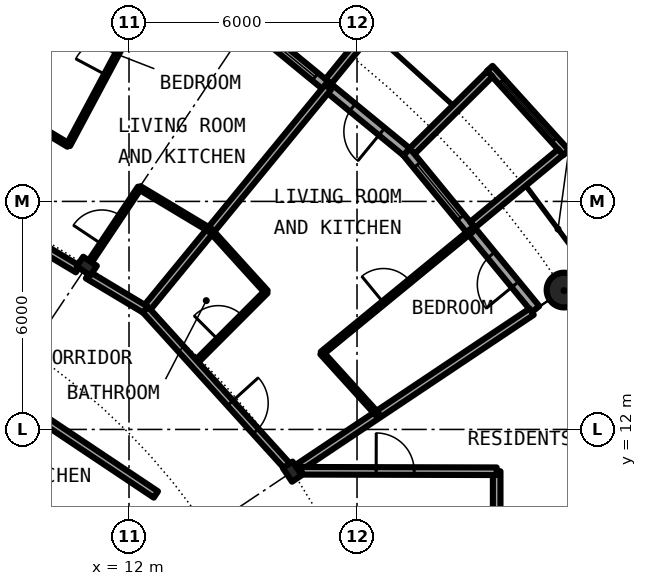
"""IFC4 building model, lengths in metres.
Left out: names, types, materials, properties, quantities, classifications, styles, units other than length and angle.
Written with IfcOpenShell. Run it as: python <this file> out.ifc"""

import sys

from ifc_helpers import new_model, si_unit, direction, frame, frame_2d, origin, origin_2d, place, context, subcontext, project, spatial, rectangle, circle, hollow_circle, i_section, extrude, element, fill, save


model = new_model("IFC4")
c1 = context("Model", 3, precision=1e-05, world=origin(), true_north=direction((0.0, 1.0)))
c2 = subcontext(c1, "Body", "Model", "MODEL_VIEW")
j1 = project(units=[si_unit("LENGTHUNIT", "METRE"), si_unit("PLANEANGLEUNIT", "RADIAN")], contexts=[c1])
p1 = place(None, origin())
s1 = spatial("IfcSite", under=j1, at=p1, CompositionType="ELEMENT")
p2 = place(p1, origin())
s2 = spatial("IfcBuilding", under=s1, at=p2, CompositionType="ELEMENT")
p3 = place(p2, frame((0.0, 0.0, 123.85)))
s3 = spatial("IfcBuildingStorey", under=s2, at=p3, CompositionType="ELEMENT", Elevation=123.85)
p4 = place(p3, frame((23.448, 15.667, 0.0), z_axis=(0.0, 0.0, 1.0), x_axis=(1.0, 0.0, 0.0)))
e1 = element("IfcColumn", 1, at=p4, inside=s3, PredefinedType="COLUMN", context=c2, shape_type="SweptSolid", body=[
    extrude(hollow_circle(Radius=0.457, WallThickness=0.04, at=origin_2d()), origin(), (0.0, 0.0, 1.0), 3.05),
])
for number, where, z_axis, x_axis in (
    (2, (16.297, 10.889, 0.0), (0.0, 0.0, 1.0), (0.831, 0.556, 0.0)),
    (3, (10.889, 16.297, 0.0), (0.0, 0.0, 1.0), (0.556, 0.831, 0.0)),
):
    element("IfcColumn", number, at=place(p3, frame(where, z_axis=z_axis, x_axis=x_axis)), inside=s3, PredefinedType="COLUMN", context=c2, shape_type="SweptSolid", body=[
        extrude(i_section(OverallWidth=0.307, OverallDepth=0.432, WebThickness=0.021, FlangeThickness=0.04, FilletRadius=0.027, at=origin_2d()), origin(), (0.0, 0.0, 1.0), 3.05),
    ])
p5 = place(p3, frame((22.699, 15.167, 0.0), z_axis=(0.0, 0.0, 1.0), x_axis=(-0.634382322723, 0.773019449054, 0.0)))
e4 = element("IfcWall", 4, at=p5, inside=s3, PredefinedType="SOLIDWALL", context=c2, shape_type="SweptSolid", body=[
    extrude(rectangle(XDim=5.352, YDim=0.25, at=frame_2d((2.676, 0.0))), origin(), (0.0, 0.0, 1.0), 2.7),
])
p6 = place(p5, frame((0.841, 0.0, 0.0)))
e5 = element("IfcOpeningElement", 5, at=p6, cuts=e4, PredefinedType="OPENING", context=c2, shape_type="SweptSolid", body=[
    extrude(rectangle(XDim=1.0, YDim=2.2, at=frame_2d((0.5, 1.1))), frame((0.0, 0.135, 0.0), z_axis=(0.0, -1.0, 0.0), x_axis=(1.0, 0.0, 0.0)), (0.0, 0.0, 1.0), 0.27),
])
p7 = place(p5, frame((3.111, 0.0, 0.3)))
e6 = element("IfcOpeningElement", 6, at=p7, cuts=e4, PredefinedType="OPENING", context=c2, shape_type="SweptSolid", body=[
    extrude(rectangle(XDim=1.8, YDim=2.1, at=frame_2d((0.9, 1.05))), frame((0.0, 0.135, 0.0), z_axis=(0.0, -1.0, 0.0), x_axis=(1.0, 0.0, 0.0)), (0.0, 0.0, 1.0), 0.27),
])
p8 = place(p3, frame((23.503, 19.282, -0.03), z_axis=(0.0, 0.0, 1.0), x_axis=(-0.671506829416, 0.740998365753, 0.0)))
e7 = element("IfcWall", 7, at=p8, inside=s3, PredefinedType="SOLIDWALL", context=c2, shape_type="SweptSolid", body=[
    extrude(rectangle(XDim=2.993, YDim=0.2, at=frame_2d((1.497, 0.0))), origin(), (0.0, 0.0, 1.0), 2.73),
])
p9 = place(p8, frame((0.457, 0.0, 0.33)))
e8 = element("IfcOpeningElement", 8, at=p9, cuts=e7, PredefinedType="OPENING", context=c2, shape_type="SweptSolid", body=[
    extrude(circle(Radius=1.04, at=frame_2d((1.04, 1.04))), frame((0.0, 0.11, 0.0), z_axis=(0.0, -1.0, 0.0), x_axis=(1.0, 0.0, 0.0)), (0.0, 0.0, 1.0), 0.22),
])
p10 = place(p3, frame((21.041, 17.384, -0.03), z_axis=(0.0, 0.0, 1.0), x_axis=(0.770784861449, 0.63709551667, 0.0)))
e9 = element("IfcWall", 9, at=p10, inside=s3, PredefinedType="SOLIDWALL", context=c2, shape_type="SweptSolid", body=[
    extrude(rectangle(XDim=3.006, YDim=0.2, at=frame_2d((1.503, 0.0))), origin(), (0.0, 0.0, 1.0), 2.73),
])
p11 = place(p3, frame((19.45, 19.323, -0.03), z_axis=(0.0, 0.0, 1.0), x_axis=(0.709727076896, 0.704476739375, 0.0)))
e10 = element("IfcWall", 10, at=p11, inside=s3, PredefinedType="SOLIDWALL", context=c2, shape_type="SweptSolid", body=[
    extrude(rectangle(XDim=2.883, YDim=0.2, at=frame_2d((1.441, 0.0))), origin(), (0.0, 0.0, 1.0), 2.73),
])
p12 = place(p3, frame((19.304, 19.304, 0.0), z_axis=(0.0, 0.0, 1.0), x_axis=(-0.773019449054, 0.634382322723, 0.0)))
e11 = element("IfcWall", 11, at=p12, inside=s3, PredefinedType="SOLIDWALL", context=c2, shape_type="SweptSolid", body=[
    extrude(rectangle(XDim=5.352, YDim=0.25, at=frame_2d((2.676, 0.0))), origin(), (0.0, 0.0, 1.0), 2.7),
])
p13 = place(p12, frame((0.841, 0.0, 0.0)))
e12 = element("IfcOpeningElement", 12, at=p13, cuts=e11, PredefinedType="OPENING", context=c2, shape_type="SweptSolid", body=[
    extrude(rectangle(XDim=1.0, YDim=2.2, at=frame_2d((0.5, 1.1))), frame((0.0, 0.135, 0.0), z_axis=(0.0, -1.0, 0.0), x_axis=(1.0, 0.0, 0.0)), (0.0, 0.0, 1.0), 0.27),
])
p14 = place(p12, frame((3.111, 0.0, 0.3)))
e13 = element("IfcOpeningElement", 13, at=p14, cuts=e11, PredefinedType="OPENING", context=c2, shape_type="SweptSolid", body=[
    extrude(rectangle(XDim=1.8, YDim=2.1, at=frame_2d((0.9, 1.05))), frame((0.0, 0.135, 0.0), z_axis=(0.0, -1.0, 0.0), x_axis=(1.0, 0.0, 0.0)), (0.0, 0.0, 1.0), 0.27),
])
p15 = place(p3, frame((17.246, 21.155, -0.03), z_axis=(0.0, 0.0, 1.0), x_axis=(0.631741648902, 0.775179004516, 0.0)))
e14 = element("IfcWall", 14, at=p15, inside=s3, PredefinedType="SOLIDWALL", context=c2, shape_type="SweptSolid", body=[
    extrude(rectangle(XDim=3.006, YDim=0.2, at=frame_2d((1.503, 0.0))), origin(), (0.0, 0.0, 1.0), 2.73),
])
p16 = place(p3, frame((21.675, 9.2, 0.0), z_axis=(0.0, 0.0, 1.0), x_axis=(0.0, 1.0, 0.0)))
e15 = element("IfcWall", 15, at=p16, inside=s3, PredefinedType="PARTITIONING", context=c2, shape_type="SweptSolid", body=[
    extrude(rectangle(XDim=1.7, YDim=0.2, at=frame_2d((0.85, 0.0))), origin(), (0.0, 0.0, 1.0), 2.7),
])
p17 = place(p3, frame((7.501, 18.108, 0.0), z_axis=(0.0, 0.0, 1.0), x_axis=(0.382490346157, 0.923959487801, 0.0)))
e16 = element("IfcWall", 16, at=p17, inside=s3, PredefinedType="PARTITIONING", context=c2, shape_type="SweptSolid", body=[
    extrude(rectangle(XDim=7.574, YDim=0.2, at=frame_2d((3.787, 0.0))), origin(), (0.0, 0.0, 1.0), 2.7),
])
p18 = place(p3, frame((10.405, 19.481, 0.0), z_axis=(0.0, 0.0, 1.0), x_axis=(0.471170755767, 0.882042016522, 0.0)))
e17 = element("IfcWall", 17, at=p18, inside=s3, PredefinedType="PARTITIONING", context=c2, shape_type="SweptSolid", body=[
    extrude(rectangle(XDim=5.089, YDim=0.1, at=frame_2d((2.545, 0.0))), origin(), (0.0, 0.0, 1.0), 2.7),
])
p19 = place(p18, frame((2.095, 0.0, 0.0)))
e18 = element("IfcOpeningElement", 18, at=p19, cuts=e17, PredefinedType="OPENING", context=c2, shape_type="SweptSolid", body=[
    extrude(rectangle(XDim=0.9, YDim=2.3, at=frame_2d((0.45, 1.15))), frame((0.0, 0.06, 0.0), z_axis=(0.0, -1.0, 0.0), x_axis=(1.0, 0.0, 0.0)), (0.0, 0.0, 1.0), 0.12),
])
p20 = place(p3, frame((11.015, 16.473, 0.0), z_axis=(0.0, 0.0, 1.0), x_axis=(0.555568680968, 0.831470649348, 0.0)))
e19 = element("IfcWall", 19, at=p20, inside=s3, PredefinedType="PARTITIONING", context=c2, shape_type="SweptSolid", body=[
    extrude(rectangle(XDim=2.27, YDim=0.1, at=frame_2d((1.135, 0.0))), origin(), (0.0, 0.0, 1.0), 2.7),
])
p21 = place(p20, frame((0.483, 0.0, 0.0)))
e20 = element("IfcOpeningElement", 20, at=p21, cuts=e19, PredefinedType="OPENING", context=c2, shape_type="SweptSolid", body=[
    extrude(rectangle(XDim=0.9, YDim=2.3, at=frame_2d((0.45, 1.15))), frame((0.0, 0.06, 0.0), z_axis=(0.0, -1.0, 0.0), x_axis=(1.0, 0.0, 0.0)), (0.0, 0.0, 1.0), 0.12),
])
p22 = place(p3, frame((12.434, 15.151, 0.0), z_axis=(0.0, 0.0, 1.0), x_axis=(0.634381303318, 0.773020285633, 0.0)))
e21 = element("IfcWall", 21, at=p22, inside=s3, PredefinedType="PARTITIONING", context=c2, shape_type="SweptSolid", body=[
    extrude(rectangle(XDim=7.576, YDim=0.2, at=frame_2d((3.788, 0.0))), origin(), (0.0, 0.0, 1.0), 2.7),
])
p23 = place(p3, frame((13.722, 13.73, 0.0), z_axis=(0.0, 0.0, 1.0), x_axis=(0.706741540154, 0.707471833659, 0.0)))
e22 = element("IfcWall", 22, at=p23, inside=s3, PredefinedType="PARTITIONING", context=c2, shape_type="SweptSolid", body=[
    extrude(rectangle(XDim=2.674, YDim=0.1, at=frame_2d((1.337, 0.0))), origin(), (0.0, 0.0, 1.0), 2.7),
])
p24 = place(p23, frame((0.887, 0.0, 0.0)))
e23 = element("IfcOpeningElement", 23, at=p24, cuts=e22, PredefinedType="OPENING", context=c2, shape_type="SweptSolid", body=[
    extrude(rectangle(XDim=0.9, YDim=2.3, at=frame_2d((0.45, 1.15))), frame((0.0, 0.06, 0.0), z_axis=(0.0, -1.0, 0.0), x_axis=(1.0, 0.0, 0.0)), (0.0, 0.0, 1.0), 0.12),
])
p25 = place(p3, frame((16.477, 11.009, 0.0), z_axis=(0.0, 0.0, 1.0), x_axis=(0.831406593008, 0.555664536482, 0.0)))
e24 = element("IfcWall", 24, at=p25, inside=s3, PredefinedType="PARTITIONING", context=c2, shape_type="SweptSolid", body=[
    extrude(rectangle(XDim=7.358, YDim=0.2, at=frame_2d((3.679, 0.0))), origin(), (0.0, 0.0, 1.0), 2.7),
])
p26 = place(p3, frame((17.077, 14.006, 0.0), z_axis=(0.0, 0.0, 1.0), x_axis=(0.77326214499, 0.634086472908, 0.0)))
e25 = element("IfcWall", 25, at=p26, inside=s3, PredefinedType="PARTITIONING", context=c2, shape_type="SweptSolid", body=[
    extrude(rectangle(XDim=5.089, YDim=0.1, at=frame_2d((2.544, 0.0))), origin(), (0.0, 0.0, 1.0), 2.7),
])
p27 = place(p26, frame((2.094, 0.0, 0.0)))
e26 = element("IfcOpeningElement", 26, at=p27, cuts=e25, PredefinedType="OPENING", context=c2, shape_type="SweptSolid", body=[
    extrude(rectangle(XDim=0.9, YDim=2.3, at=frame_2d((0.45, 1.15))), frame((0.0, 0.06, 0.0), z_axis=(0.0, -1.0, 0.0), x_axis=(1.0, 0.0, 0.0)), (0.0, 0.0, 1.0), 0.12),
])
p28 = place(p3, frame((16.541, 10.912, 0.0), z_axis=(0.0, 0.0, 1.0), x_axis=(0.999997173357, -0.002377662213, 0.0)))
e27 = element("IfcWall", 27, at=p28, inside=s3, PredefinedType="PARTITIONING", context=c2, shape_type="SweptSolid", body=[
    extrude(rectangle(XDim=5.134, YDim=0.2, at=frame_2d((2.567, 0.0))), origin(), (0.0, 0.0, 1.0), 2.7),
])
p29 = place(p28, frame((1.963, 0.0, 0.0)))
e28 = element("IfcOpeningElement", 28, at=p29, cuts=e27, PredefinedType="OPENING", context=c2, shape_type="SweptSolid", body=[
    extrude(rectangle(XDim=1.0, YDim=2.3, at=frame_2d((0.5, 1.15))), frame((0.0, 0.11, 0.0), z_axis=(0.0, -1.0, 0.0), x_axis=(1.0, 0.0, 0.0)), (0.0, 0.0, 1.0), 0.22),
])
p30 = place(p3, frame((3.3, 16.574, 0.0), z_axis=(0.0, 0.0, 1.0), x_axis=(0.831455567902, -0.555591251376, 0.0)))
e29 = element("IfcWall", 29, at=p30, inside=s3, PredefinedType="PARTITIONING", context=c2, shape_type="SweptSolid", body=[
    extrude(rectangle(XDim=11.314, YDim=0.2, at=frame_2d((5.657, 0.0))), origin(), (0.0, 0.0, 1.0), 2.7),
])
p31 = place(p30, frame((4.346, 0.0, 0.0)))
e30 = element("IfcOpeningElement", 30, at=p31, cuts=e29, PredefinedType="OPENING", context=c2, shape_type="SweptSolid", body=[
    extrude(rectangle(XDim=1.0, YDim=2.3, at=frame_2d((0.5, 1.15))), frame((0.0, 0.11, 0.0), z_axis=(0.0, -1.0, 0.0), x_axis=(1.0, 0.0, 0.0)), (0.0, 0.0, 1.0), 0.22),
])
p32 = place(p3, frame((7.501, 18.108, 0.0), z_axis=(0.0, 0.0, 1.0), x_axis=(0.857774179698, -0.514026708103, 0.0)))
e31 = element("IfcWall", 31, at=p32, inside=s3, PredefinedType="PARTITIONING", context=c2, shape_type="SweptSolid", body=[
    extrude(rectangle(XDim=3.675, YDim=0.2, at=frame_2d((1.837, 0.0))), origin(), (0.0, 0.0, 1.0), 2.39),
])
p33 = place(p32, frame((1.418, 0.0, 0.0)))
e32 = element("IfcOpeningElement", 32, at=p33, cuts=e31, PredefinedType="OPENING", context=c2, shape_type="SweptSolid", body=[
    extrude(rectangle(XDim=1.0, YDim=2.3, at=frame_2d((0.5, 1.15))), frame((0.0, 0.11, 0.0), z_axis=(0.0, -1.0, 0.0), x_axis=(1.0, 0.0, 0.0)), (0.0, 0.0, 1.0), 0.22),
])
p34 = place(p3, frame((10.916, 16.061, 0.0), z_axis=(0.0, 0.0, 1.0), x_axis=(0.857663265693, -0.514211748875, 0.0)))
e33 = element("IfcWall", 33, at=p34, inside=s3, PredefinedType="PARTITIONING", context=c2, shape_type="SweptSolid", body=[
    extrude(rectangle(XDim=1.77, YDim=0.2, at=frame_2d((0.885, 0.0))), origin(), (0.0, 0.0, 1.0), 2.39),
])
p35 = place(p3, frame((12.434, 15.151, 0.0), z_axis=(0.0, 0.0, 1.0), x_axis=(0.671481997275, -0.741020868354, 0.0)))
e34 = element("IfcWall", 34, at=p35, inside=s3, PredefinedType="PARTITIONING", context=c2, shape_type="SweptSolid", body=[
    extrude(rectangle(XDim=5.596, YDim=0.2, at=frame_2d((2.798, 0.0))), origin(), (0.0, 0.0, 1.0), 2.39),
])
p36 = place(p35, frame((3.319, 0.0, 0.0)))
e35 = element("IfcOpeningElement", 35, at=p36, cuts=e34, PredefinedType="OPENING", context=c2, shape_type="SweptSolid", body=[
    extrude(rectangle(XDim=1.0, YDim=2.3, at=frame_2d((0.5, 1.15))), frame((0.0, 0.11, 0.0), z_axis=(0.0, -1.0, 0.0), x_axis=(1.0, 0.0, 0.0)), (0.0, 0.0, 1.0), 0.22),
])
for number, where, z_axis, x_axis in (
    (36, (8.534, 20.603, 0.0), (0.0, 0.0, 1.0), (0.858, -0.514, 0.0)),
    (37, (12.276, 18.359, 0.0), (0.0, 0.0, 1.0), (0.858, -0.514, 0.0)),
):
    element("IfcWall", number, at=place(p3, frame(where, z_axis=z_axis, x_axis=x_axis)), inside=s3, PredefinedType="PARTITIONING", context=c2, shape_type="SweptSolid", body=[
        extrude(rectangle(XDim=2.182, YDim=0.1, at=frame_2d((1.091, 0.0))), origin(), (0.0, 0.0, 1.0), 2.7),
    ])
p37 = place(p3, frame((14.147, 17.238, 0.0), z_axis=(0.0, 0.0, 1.0), x_axis=(0.671674967707, -0.740845960882, 0.0)))
e38 = element("IfcWall", 38, at=p37, inside=s3, PredefinedType="PARTITIONING", context=c2, shape_type="SweptSolid", body=[
    extrude(rectangle(XDim=2.181, YDim=0.1, at=frame_2d((1.091, 0.0))), origin(), (0.0, 0.0, 1.0), 2.7),
])
p38 = place(p3, frame((17.072, 14.011, 0.0), z_axis=(0.0, 0.0, 1.0), x_axis=(0.67169789574, -0.740825172937, 0.0)))
e39 = element("IfcWall", 39, at=p38, inside=s3, PredefinedType="PARTITIONING", context=c2, shape_type="SweptSolid", body=[
    extrude(rectangle(XDim=2.183, YDim=0.1, at=frame_2d((1.091, 0.0))), origin(), (0.0, 0.0, 1.0), 2.7),
])
p39 = place(p6, origin())
e40 = element("IfcDoor", 40, at=p39, inside=s3, OperationType="SINGLE_SWING_LEFT", PredefinedType="DOOR", context=c2, shape_type="SweptSolid", body=[
    extrude(rectangle(XDim=1.0, YDim=2.2, at=frame_2d((0.5, 1.1))), frame((0.0, 0.025, 0.0), z_axis=(0.0, -1.0, 0.0), x_axis=(1.0, 0.0, 0.0)), (0.0, 0.0, 1.0), 0.05),
])
fill(e5, e40)
p40 = place(p7, origin())
e41 = element("IfcWindow", 41, at=p40, inside=s3, PartitioningType="SINGLE_PANEL", PredefinedType="WINDOW", context=c2, shape_type="SweptSolid", body=[
    extrude(rectangle(XDim=1.8, YDim=2.1, at=frame_2d((0.9, 1.05))), frame((0.0, 0.03, 0.0), z_axis=(0.0, -1.0, 0.0), x_axis=(1.0, 0.0, 0.0)), (0.0, 0.0, 1.0), 0.06),
])
fill(e6, e41)
p41 = place(p9, origin())
e42 = element("IfcWindow", 42, at=p41, inside=s3, PartitioningType="SINGLE_PANEL", PredefinedType="WINDOW", context=c2, shape_type="SweptSolid", body=[
    extrude(circle(Radius=1.04, at=frame_2d((1.04, 1.04))), frame((0.0, 0.03, 0.0), z_axis=(0.0, -1.0, 0.0), x_axis=(1.0, 0.0, 0.0)), (0.0, 0.0, 1.0), 0.06),
])
fill(e8, e42)
p42 = place(p13, origin())
e43 = element("IfcDoor", 43, at=p42, inside=s3, OperationType="SINGLE_SWING_LEFT", PredefinedType="DOOR", context=c2, shape_type="SweptSolid", body=[
    extrude(rectangle(XDim=1.0, YDim=2.2, at=frame_2d((0.5, 1.1))), frame((0.0, 0.025, 0.0), z_axis=(0.0, -1.0, 0.0), x_axis=(1.0, 0.0, 0.0)), (0.0, 0.0, 1.0), 0.05),
])
fill(e12, e43)
p43 = place(p14, origin())
e44 = element("IfcWindow", 44, at=p43, inside=s3, PartitioningType="SINGLE_PANEL", PredefinedType="WINDOW", context=c2, shape_type="SweptSolid", body=[
    extrude(rectangle(XDim=1.8, YDim=2.1, at=frame_2d((0.9, 1.05))), frame((0.0, 0.03, 0.0), z_axis=(0.0, -1.0, 0.0), x_axis=(1.0, 0.0, 0.0)), (0.0, 0.0, 1.0), 0.06),
])
fill(e13, e44)
p44 = place(p36, origin())
e45 = element("IfcDoor", 45, at=p44, inside=s3, OperationType="SINGLE_SWING_RIGHT", PredefinedType="DOOR", context=c2, shape_type="SweptSolid", body=[
    extrude(rectangle(XDim=1.0, YDim=2.3, at=frame_2d((0.5, 1.15))), frame((0.0, 0.025, 0.0), z_axis=(0.0, -1.0, 0.0), x_axis=(1.0, 0.0, 0.0)), (0.0, 0.0, 1.0), 0.05),
])
fill(e35, e45)
p45 = place(p24, origin())
e46 = element("IfcDoor", 46, at=p45, inside=s3, OperationType="SINGLE_SWING_RIGHT", PredefinedType="DOOR", context=c2, shape_type="SweptSolid", body=[
    extrude(rectangle(XDim=0.9, YDim=2.3, at=frame_2d((0.45, 1.15))), frame((0.0, 0.025, 0.0), z_axis=(0.0, -1.0, 0.0), x_axis=(1.0, 0.0, 0.0)), (0.0, 0.0, 1.0), 0.05),
])
fill(e23, e46)
p46 = place(p27, origin())
e47 = element("IfcDoor", 47, at=p46, inside=s3, OperationType="SINGLE_SWING_RIGHT", PredefinedType="DOOR", context=c2, shape_type="SweptSolid", body=[
    extrude(rectangle(XDim=0.9, YDim=2.3, at=frame_2d((0.45, 1.15))), frame((0.0, 0.025, 0.0), z_axis=(0.0, -1.0, 0.0), x_axis=(1.0, 0.0, 0.0)), (0.0, 0.0, 1.0), 0.05),
])
fill(e26, e47)
p47 = place(p21, origin())
e48 = element("IfcDoor", 48, at=p47, inside=s3, OperationType="SINGLE_SWING_LEFT", PredefinedType="DOOR", context=c2, shape_type="SweptSolid", body=[
    extrude(rectangle(XDim=0.9, YDim=2.3, at=frame_2d((0.45, 1.15))), frame((0.0, 0.025, 0.0), z_axis=(0.0, -1.0, 0.0), x_axis=(1.0, 0.0, 0.0)), (0.0, 0.0, 1.0), 0.05),
])
fill(e20, e48)
p48 = place(p19, origin())
e49 = element("IfcDoor", 49, at=p48, inside=s3, OperationType="SINGLE_SWING_RIGHT", PredefinedType="DOOR", context=c2, shape_type="SweptSolid", body=[
    extrude(rectangle(XDim=0.9, YDim=2.3, at=frame_2d((0.45, 1.15))), frame((0.0, 0.025, 0.0), z_axis=(0.0, -1.0, 0.0), x_axis=(1.0, 0.0, 0.0)), (0.0, 0.0, 1.0), 0.05),
])
fill(e18, e49)
p49 = place(p29, origin())
e50 = element("IfcDoor", 50, at=p49, inside=s3, OperationType="SINGLE_SWING_LEFT", PredefinedType="DOOR", context=c2, shape_type="SweptSolid", body=[
    extrude(rectangle(XDim=1.0, YDim=2.3, at=frame_2d((0.5, 1.15))), frame((0.0, 0.025, 0.0), z_axis=(0.0, -1.0, 0.0), x_axis=(1.0, 0.0, 0.0)), (0.0, 0.0, 1.0), 0.05),
])
fill(e28, e50)
save(model, sys.argv[1])
